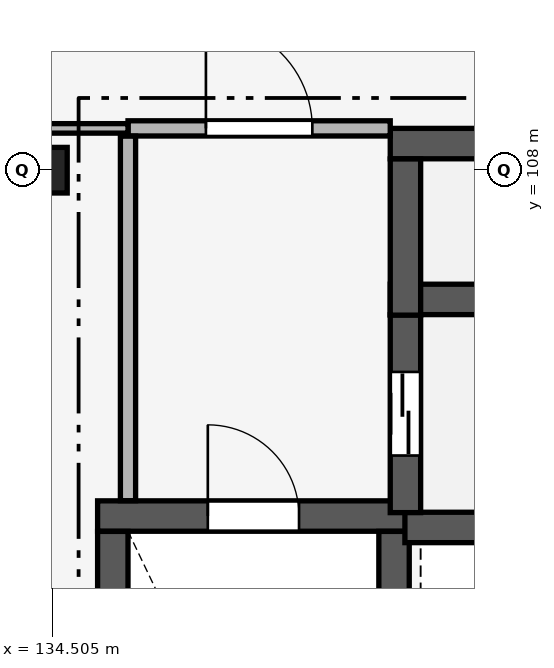
"""IFC4 building model, lengths in metres.
Left out: names, types, materials, properties, quantities, classifications, styles, units other than length and angle.
Written with IfcOpenShell. Run it as: python <this file> out.ifc"""

import sys

from ifc_helpers import new_model, si_unit, direction, frame, frame_2d, origin, origin_2d, place, context, subcontext, project, spatial, rectangle, extrude, element, fill, save


model = new_model("IFC4")
c1 = context("Model", 3, precision=1e-05, world=origin(), true_north=direction((0.0, 1.0)))
c2 = subcontext(c1, "Body", "Model", "MODEL_VIEW")
j1 = project(units=[si_unit("LENGTHUNIT", "METRE"), si_unit("PLANEANGLEUNIT", "RADIAN")], contexts=[c1])
p1 = place(None, origin())
s1 = spatial("IfcSite", under=j1, at=p1, CompositionType="ELEMENT")
p2 = place(p1, origin())
s2 = spatial("IfcBuilding", under=s1, at=p2, CompositionType="ELEMENT")
p3 = place(p2, frame((0.0, 0.0, 42.0)))
s3 = spatial("IfcBuildingStorey", under=s2, at=p3, CompositionType="ELEMENT", Elevation=42.0)
p4 = place(p3, frame((134.4, 108.0, 0.0), z_axis=(0.0, 0.0, 1.0), x_axis=(1.0, 0.0, 0.0)))
e1 = element("IfcColumn", 1, at=p4, inside=s3, PredefinedType="COLUMN", context=c2, shape_type="SweptSolid", body=[
    extrude(rectangle(XDim=0.6, YDim=0.6, at=origin_2d()), origin(), (0.0, 0.0, 1.0), 3.9),
])
p5 = place(p3, frame((135.1, 103.45, 0.0), z_axis=(0.0, 0.0, 1.0), x_axis=(1.0, 0.0, 0.0)))
e2 = element("IfcWall", 2, at=p5, inside=s3, PredefinedType="SHEAR", context=c2, shape_type="SweptSolid", body=[
    extrude(rectangle(XDim=4.1, YDim=0.4, at=frame_2d((2.05, 0.0))), origin(), (0.0, 0.0, 1.0), 3.66),
])
p6 = place(p5, frame((1.45, 0.0, 0.0)))
e3 = element("IfcOpeningElement", 3, at=p6, cuts=e2, PredefinedType="OPENING", context=c2, shape_type="SweptSolid", body=[
    extrude(rectangle(XDim=1.2, YDim=2.2, at=frame_2d((0.6, 1.1))), frame((0.0, 0.215, 0.0), z_axis=(0.0, -1.0, 0.0), x_axis=(1.0, 0.0, 0.0)), (0.0, 0.0, 1.0), 0.43),
])
for number, where, z_axis, x_axis in (
    (4, (135.3, 96.352, 0.0), (0.0, 0.0, 1.0), (0.0, 1.0, 0.0)),
    (5, (139.0, 96.352, 0.0), (0.0, 0.0, 1.0), (0.0, 1.0, 0.0)),
):
    element("IfcWall", number, at=place(p3, frame(where, z_axis=z_axis, x_axis=x_axis)), inside=s3, PredefinedType="SHEAR", context=c2, shape_type="SweptSolid", body=[
        extrude(rectangle(XDim=6.896, YDim=0.4, at=frame_2d((3.448, 0.0))), origin(), (0.0, 0.0, 1.0), 3.66),
    ])
p7 = place(p3, frame((139.143, 103.3, 0.0), z_axis=(0.0, 0.0, 1.0), x_axis=(1.0, 0.0, 0.0)))
e6 = element("IfcWall", 6, at=p7, inside=s3, PredefinedType="SHEAR", context=c2, shape_type="SweptSolid", body=[
    extrude(rectangle(XDim=3.007, YDim=0.4, at=frame_2d((1.503, 0.0))), origin(), (0.0, 0.0, 1.0), 3.9),
])
p8 = place(p3, frame((138.95, 106.3, 0.0), z_axis=(0.0, 0.0, 1.0), x_axis=(1.0, 0.0, 0.0)))
e7 = element("IfcWall", 7, at=p8, inside=s3, PredefinedType="SHEAR", context=c2, shape_type="SweptSolid", body=[
    extrude(rectangle(XDim=3.2, YDim=0.4, at=frame_2d((1.6, 0.0))), origin(), (0.0, 0.0, 1.0), 3.9),
])
p9 = place(p3, frame((139.15, 103.495, 0.0), z_axis=(0.0, 0.0, 1.0), x_axis=(0.0, 1.0, 0.0)))
e8 = element("IfcWall", 8, at=p9, inside=s3, PredefinedType="SHEAR", context=c2, shape_type="SweptSolid", body=[
    extrude(rectangle(XDim=2.603, YDim=0.4, at=frame_2d((1.301, 0.0))), origin(), (0.0, 0.0, 1.0), 3.9),
])
p10 = place(p9, frame((0.751, 0.0, 0.0)))
e9 = element("IfcOpeningElement", 9, at=p10, cuts=e8, PredefinedType="OPENING", context=c2, shape_type="SweptSolid", body=[
    extrude(rectangle(XDim=1.1, YDim=2.15, at=frame_2d((0.55, 1.075))), frame((0.0, 0.215, 0.0), z_axis=(0.0, -1.0, 0.0), x_axis=(1.0, 0.0, 0.0)), (0.0, 0.0, 1.0), 0.43),
])
p11 = place(p3, frame((138.95, 108.35, 0.0), z_axis=(0.0, 0.0, 1.0), x_axis=(1.0, 0.0, 0.0)))
e10 = element("IfcWall", 10, at=p11, inside=s3, PredefinedType="SHEAR", context=c2, shape_type="SweptSolid", body=[
    extrude(rectangle(XDim=3.559, YDim=0.4, at=frame_2d((1.78, 0.0))), origin(), (0.0, 0.0, 1.0), 3.9),
])
p12 = place(p11, frame((1.229, 0.0, 0.0)))
e11 = element("IfcOpeningElement", 11, at=p12, cuts=e10, PredefinedType="OPENING", context=c2, shape_type="SweptSolid", body=[
    extrude(rectangle(XDim=1.1, YDim=2.15, at=frame_2d((0.55, 1.075))), frame((0.0, 0.215, 0.0), z_axis=(0.0, -1.0, 0.0), x_axis=(1.0, 0.0, 0.0)), (0.0, 0.0, 1.0), 0.43),
])
p13 = place(p3, frame((139.15, 106.093, 0.0), z_axis=(0.0, 0.0, 1.0), x_axis=(0.0, 1.0, 0.0)))
e12 = element("IfcWall", 12, at=p13, inside=s3, PredefinedType="SHEAR", context=c2, shape_type="SweptSolid", body=[
    extrude(rectangle(XDim=2.055, YDim=0.4, at=frame_2d((1.027, 0.0))), origin(), (0.0, 0.0, 1.0), 3.9),
])
p14 = place(p3, frame((135.5, 108.55, 0.0), z_axis=(0.0, 0.0, 1.0), x_axis=(1.0, 0.0, 0.0)))
e13 = element("IfcWall", 13, at=p14, inside=s3, PredefinedType="PARTITIONING", context=c2, shape_type="SweptSolid", body=[
    extrude(rectangle(XDim=3.45, YDim=0.2, at=frame_2d((1.725, 0.0))), origin(), (0.0, 0.0, 1.0), 3.66),
])
p15 = place(p14, frame((1.025, 0.0, 0.0)))
e14 = element("IfcOpeningElement", 14, at=p15, cuts=e13, PredefinedType="OPENING", context=c2, shape_type="SweptSolid", body=[
    extrude(rectangle(XDim=1.4, YDim=2.2, at=frame_2d((0.7, 1.1))), frame((0.0, 0.115, 0.0), z_axis=(0.0, -1.0, 0.0), x_axis=(1.0, 0.0, 0.0)), (0.0, 0.0, 1.0), 0.23),
])
p16 = place(p3, frame((134.335, 108.55, 0.0), z_axis=(0.0, 0.0, 1.0), x_axis=(1.0, 0.0, 0.0)))
e15 = element("IfcWall", 15, at=p16, inside=s3, PredefinedType="PARTITIONING", context=c2, shape_type="SweptSolid", body=[
    extrude(rectangle(XDim=1.165, YDim=0.125, at=frame_2d((0.583, 0.0))), origin(), (0.0, 0.0, 1.0), 3.11),
])
p17 = place(p3, frame((135.5, 103.652, 0.0), z_axis=(0.0, 0.0, 1.0), x_axis=(0.0, 1.0, 0.0)))
e16 = element("IfcWall", 16, at=p17, inside=s3, PredefinedType="PARTITIONING", context=c2, shape_type="SweptSolid", body=[
    extrude(rectangle(XDim=4.796, YDim=0.2, at=frame_2d((2.398, 0.0))), origin(), (0.0, 0.0, 1.0), 2.96),
])
p18 = place(p6, origin())
e17 = element("IfcDoor", 17, at=p18, inside=s3, OperationType="SINGLE_SWING_LEFT", PredefinedType="DOOR", context=c2, shape_type="SweptSolid", body=[
    extrude(rectangle(XDim=1.2, YDim=2.2, at=frame_2d((0.6, 1.1))), frame((0.0, 0.025, 0.0), z_axis=(0.0, -1.0, 0.0), x_axis=(1.0, 0.0, 0.0)), (0.0, 0.0, 1.0), 0.05),
])
fill(e3, e17)
p19 = place(p10, origin())
e18 = element("IfcDoor", 18, at=p19, inside=s3, OperationType="DOUBLE_DOOR_SLIDING", PredefinedType="DOOR", context=c2, shape_type="SweptSolid", body=[
    extrude(rectangle(XDim=1.1, YDim=2.15, at=frame_2d((0.55, 1.075))), frame((0.0, 0.025, 0.0), z_axis=(0.0, -1.0, 0.0), x_axis=(1.0, 0.0, 0.0)), (0.0, 0.0, 1.0), 0.05),
])
fill(e9, e18)
p20 = place(p15, origin())
e19 = element("IfcDoor", 19, at=p20, inside=s3, OperationType="SINGLE_SWING_LEFT", PredefinedType="DOOR", context=c2, shape_type="SweptSolid", body=[
    extrude(rectangle(XDim=1.4, YDim=2.2, at=frame_2d((0.7, 1.1))), frame((0.0, 0.025, 0.0), z_axis=(0.0, -1.0, 0.0), x_axis=(1.0, 0.0, 0.0)), (0.0, 0.0, 1.0), 0.05),
])
fill(e14, e19)
save(model, sys.argv[1])
